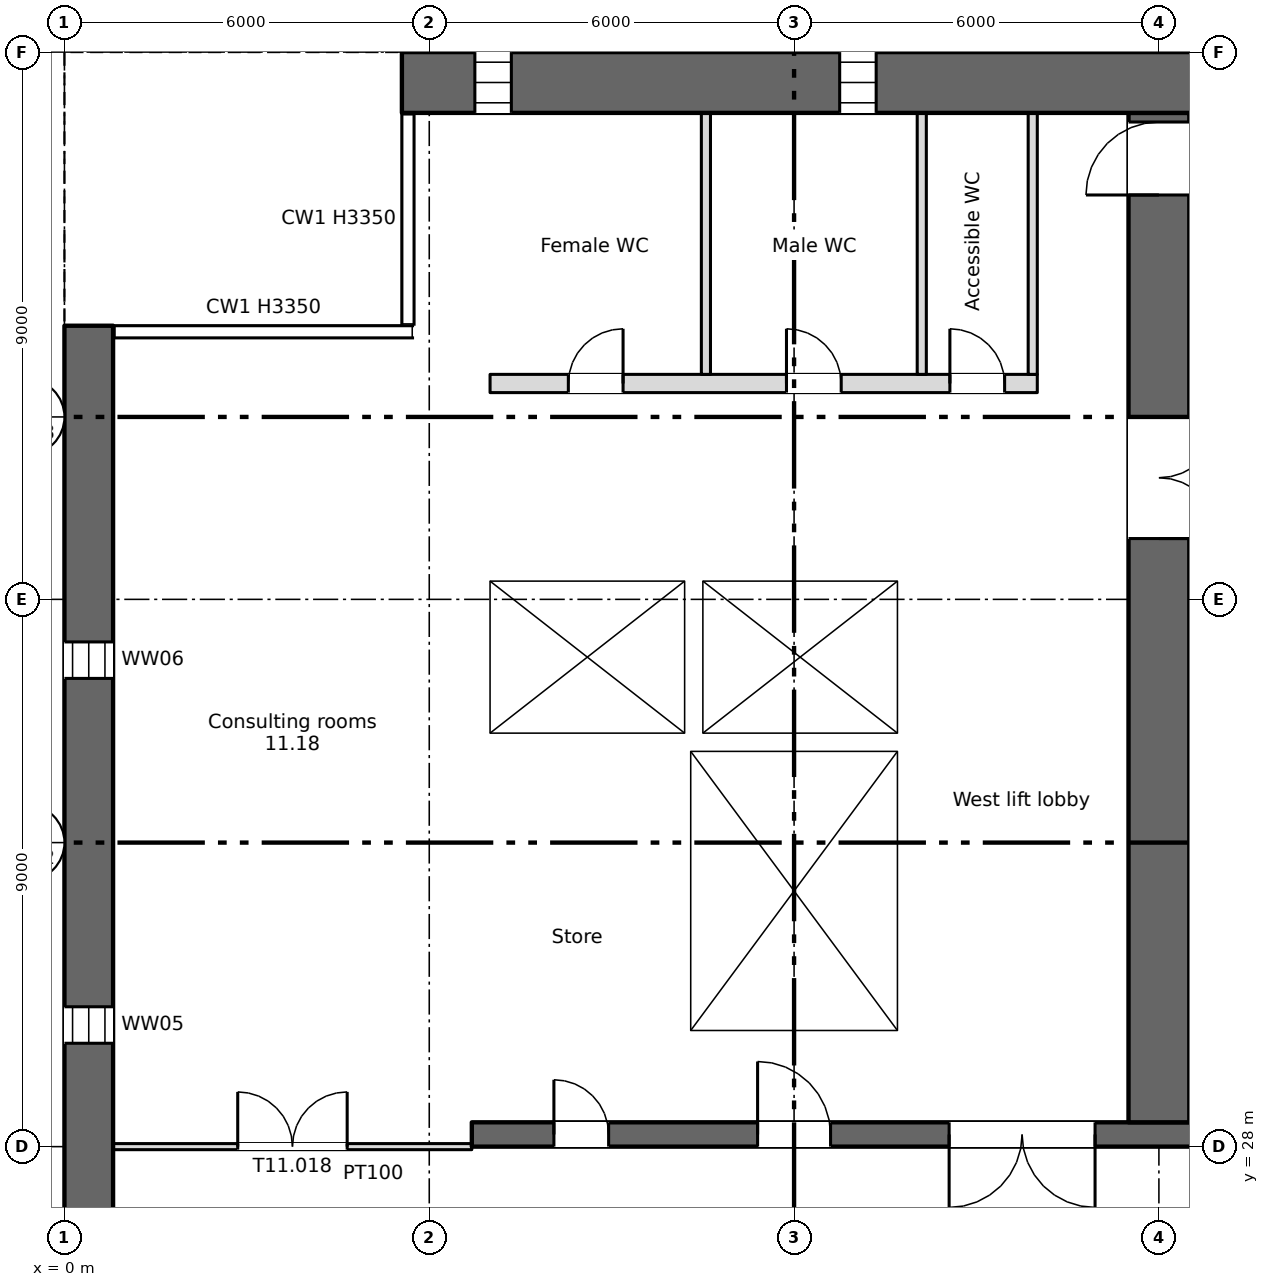
"""IFC4 building model, lengths in metres.
Left out: names, types, materials, properties, quantities, classifications, styles, units other than length and angle.
Written with IfcOpenShell. Run it as: python <this file> out.ifc"""

import sys

from ifc_helpers import new_model, si_unit, direction, frame, frame_2d, origin, place, context, subcontext, project, spatial, rectangle, extrude, element, fill, save


model = new_model("IFC4")
c1 = context("Model", 3, precision=1e-05, world=origin(), true_north=direction((0.0, 1.0)))
c2 = subcontext(c1, "Body", "Model", "MODEL_VIEW")
j1 = project(units=[si_unit("LENGTHUNIT", "METRE"), si_unit("PLANEANGLEUNIT", "RADIAN")], contexts=[c1])
p1 = place(None, origin())
s1 = spatial("IfcSite", under=j1, at=p1, CompositionType="ELEMENT")
p2 = place(p1, origin())
s2 = spatial("IfcBuilding", under=s1, at=p2, CompositionType="ELEMENT")
p3 = place(p2, frame((0.0, 0.0, 56.25)))
s3 = spatial("IfcBuildingStorey", under=s2, at=p3, CompositionType="ELEMENT", Elevation=56.25)
p4 = place(p3, frame((0.4, 4.5, 0.0), z_axis=(0.0, 0.0, 1.0), x_axis=(0.0, 1.0, 0.0)))
e1 = element("IfcWall", 1, at=p4, inside=s3, PredefinedType="SHEAR", context=c2, shape_type="SweptSolid", body=[
    extrude(rectangle(XDim=37.0, YDim=0.8, at=frame_2d((18.5, 0.0))), origin(), (0.0, 0.0, 1.0), 3.35),
])
p5 = place(p4, frame((1.2, 0.0, 0.6)))
e2 = element("IfcOpeningElement", 2, at=p5, cuts=e1, PredefinedType="OPENING", context=c2, shape_type="SweptSolid", body=[
    extrude(rectangle(XDim=0.6, YDim=2.4, at=frame_2d((0.3, 1.2))), frame((0.0, 0.41, 0.0), z_axis=(0.0, -1.0, 0.0), x_axis=(1.0, 0.0, 0.0)), (0.0, 0.0, 1.0), 0.82),
])
p6 = place(p4, frame((7.2, 0.0, 0.6)))
e3 = element("IfcOpeningElement", 3, at=p6, cuts=e1, PredefinedType="OPENING", context=c2, shape_type="SweptSolid", body=[
    extrude(rectangle(XDim=0.6, YDim=2.4, at=frame_2d((0.3, 1.2))), frame((0.0, 0.41, 0.0), z_axis=(0.0, -1.0, 0.0), x_axis=(1.0, 0.0, 0.0)), (0.0, 0.0, 1.0), 0.82),
])
p7 = place(p4, frame((13.2, 0.0, 0.6)))
e4 = element("IfcOpeningElement", 4, at=p7, cuts=e1, PredefinedType="OPENING", context=c2, shape_type="SweptSolid", body=[
    extrude(rectangle(XDim=0.6, YDim=2.4, at=frame_2d((0.3, 1.2))), frame((0.0, 0.41, 0.0), z_axis=(0.0, -1.0, 0.0), x_axis=(1.0, 0.0, 0.0)), (0.0, 0.0, 1.0), 0.82),
])
p8 = place(p4, frame((19.2, 0.0, 0.6)))
e5 = element("IfcOpeningElement", 5, at=p8, cuts=e1, PredefinedType="OPENING", context=c2, shape_type="SweptSolid", body=[
    extrude(rectangle(XDim=0.6, YDim=2.4, at=frame_2d((0.3, 1.2))), frame((0.0, 0.41, 0.0), z_axis=(0.0, -1.0, 0.0), x_axis=(1.0, 0.0, 0.0)), (0.0, 0.0, 1.0), 0.82),
])
p9 = place(p4, frame((25.2, 0.0, 0.6)))
e6 = element("IfcOpeningElement", 6, at=p9, cuts=e1, PredefinedType="OPENING", context=c2, shape_type="SweptSolid", body=[
    extrude(rectangle(XDim=0.6, YDim=2.4, at=frame_2d((0.3, 1.2))), frame((0.0, 0.41, 0.0), z_axis=(0.0, -1.0, 0.0), x_axis=(1.0, 0.0, 0.0)), (0.0, 0.0, 1.0), 0.82),
])
p10 = place(p4, frame((31.2, 0.0, 0.6)))
e7 = element("IfcOpeningElement", 7, at=p10, cuts=e1, PredefinedType="OPENING", context=c2, shape_type="SweptSolid", body=[
    extrude(rectangle(XDim=0.6, YDim=2.4, at=frame_2d((0.3, 1.2))), frame((0.0, 0.41, 0.0), z_axis=(0.0, -1.0, 0.0), x_axis=(1.0, 0.0, 0.0)), (0.0, 0.0, 1.0), 0.82),
])
p11 = place(p3, frame((5.55, 45.5, 0.0), z_axis=(0.0, 0.0, 1.0), x_axis=(1.0, 0.0, 0.0)))
e8 = element("IfcWall", 8, at=p11, inside=s3, PredefinedType="SHEAR", context=c2, shape_type="SweptSolid", body=[
    extrude(rectangle(XDim=66.9, YDim=1.0, at=frame_2d((33.45, 0.0))), origin(), (0.0, 0.0, 1.0), 3.35),
])
p12 = place(p11, frame((1.2, 0.0, 0.6)))
e9 = element("IfcOpeningElement", 9, at=p12, cuts=e8, PredefinedType="OPENING", context=c2, shape_type="SweptSolid", body=[
    extrude(rectangle(XDim=0.6, YDim=2.4, at=frame_2d((0.3, 1.2))), frame((0.0, 0.51, 0.0), z_axis=(0.0, -1.0, 0.0), x_axis=(1.0, 0.0, 0.0)), (0.0, 0.0, 1.0), 1.02),
])
p13 = place(p11, frame((7.2, 0.0, 0.6)))
e10 = element("IfcOpeningElement", 10, at=p13, cuts=e8, PredefinedType="OPENING", context=c2, shape_type="SweptSolid", body=[
    extrude(rectangle(XDim=0.6, YDim=2.4, at=frame_2d((0.3, 1.2))), frame((0.0, 0.51, 0.0), z_axis=(0.0, -1.0, 0.0), x_axis=(1.0, 0.0, 0.0)), (0.0, 0.0, 1.0), 1.02),
])
p14 = place(p11, frame((61.2, 0.0, 0.6)))
e11 = element("IfcOpeningElement", 11, at=p14, cuts=e8, PredefinedType="OPENING", context=c2, shape_type="SweptSolid", body=[
    extrude(rectangle(XDim=0.6, YDim=2.4, at=frame_2d((0.3, 1.2))), frame((0.0, 0.51, 0.0), z_axis=(0.0, -1.0, 0.0), x_axis=(1.0, 0.0, 0.0)), (0.0, 0.0, 1.0), 1.02),
])
p15 = place(p3, frame((6.7, 28.2, 0.0), z_axis=(0.0, 0.0, 1.0), x_axis=(1.0, 0.0, 0.0)))
e12 = element("IfcWall", 12, at=p15, inside=s3, PredefinedType="SHEAR", context=c2, shape_type="SweptSolid", body=[
    extrude(rectangle(XDim=57.8, YDim=0.4, at=frame_2d((28.9, 0.0))), origin(), (0.0, 0.0, 1.0), 3.35),
])
p16 = place(p15, frame((13.85, 0.0, 0.0)))
e13 = element("IfcOpeningElement", 13, at=p16, cuts=e12, PredefinedType="OPENING", context=c2, shape_type="SweptSolid", body=[
    extrude(rectangle(XDim=0.9, YDim=2.1, at=frame_2d((0.45, 1.05))), frame((0.0, 0.21, 0.0), z_axis=(0.0, -1.0, 0.0), x_axis=(1.0, 0.0, 0.0)), (0.0, 0.0, 1.0), 0.42),
])
p17 = place(p15, frame((48.562, 0.0, 0.0)))
e14 = element("IfcOpeningElement", 14, at=p17, cuts=e12, PredefinedType="OPENING", context=c2, shape_type="SweptSolid", body=[
    extrude(rectangle(XDim=0.9, YDim=2.1, at=frame_2d((0.45, 1.05))), frame((0.0, 0.21, 0.0), z_axis=(0.0, -1.0, 0.0), x_axis=(1.0, 0.0, 0.0)), (0.0, 0.0, 1.0), 0.42),
])
p18 = place(p15, frame((51.137, 0.0, 0.0)))
e15 = element("IfcOpeningElement", 15, at=p18, cuts=e12, PredefinedType="OPENING", context=c2, shape_type="SweptSolid", body=[
    extrude(rectangle(XDim=0.9, YDim=2.1, at=frame_2d((0.45, 1.05))), frame((0.0, 0.21, 0.0), z_axis=(0.0, -1.0, 0.0), x_axis=(1.0, 0.0, 0.0)), (0.0, 0.0, 1.0), 0.42),
])
p19 = place(p15, frame((1.35, 0.0, 0.0)))
e16 = element("IfcOpeningElement", 16, at=p19, cuts=e12, PredefinedType="OPENING", context=c2, shape_type="SweptSolid", body=[
    extrude(rectangle(XDim=0.9, YDim=2.1, at=frame_2d((0.45, 1.05))), frame((0.0, 0.21, 0.0), z_axis=(0.0, -1.0, 0.0), x_axis=(1.0, 0.0, 0.0)), (0.0, 0.0, 1.0), 0.42),
])
p20 = place(p15, frame((4.7, 0.0, 0.0)))
e17 = element("IfcOpeningElement", 17, at=p20, cuts=e12, PredefinedType="OPENING", context=c2, shape_type="SweptSolid", body=[
    extrude(rectangle(XDim=1.2, YDim=2.1, at=frame_2d((0.6, 1.05))), frame((0.0, 0.21, 0.0), z_axis=(0.0, -1.0, 0.0), x_axis=(1.0, 0.0, 0.0)), (0.0, 0.0, 1.0), 0.42),
])
p21 = place(p15, frame((31.7, 0.0, 0.0)))
e18 = element("IfcOpeningElement", 18, at=p21, cuts=e12, PredefinedType="OPENING", context=c2, shape_type="SweptSolid", body=[
    extrude(rectangle(XDim=1.2, YDim=2.1, at=frame_2d((0.6, 1.05))), frame((0.0, 0.21, 0.0), z_axis=(0.0, -1.0, 0.0), x_axis=(1.0, 0.0, 0.0)), (0.0, 0.0, 1.0), 0.42),
])
p22 = place(p15, frame((55.2, 0.0, 0.0)))
e19 = element("IfcOpeningElement", 19, at=p22, cuts=e12, PredefinedType="OPENING", context=c2, shape_type="SweptSolid", body=[
    extrude(rectangle(XDim=1.2, YDim=2.1, at=frame_2d((0.6, 1.05))), frame((0.0, 0.21, 0.0), z_axis=(0.0, -1.0, 0.0), x_axis=(1.0, 0.0, 0.0)), (0.0, 0.0, 1.0), 0.42),
])
p23 = place(p15, frame((21.7, 0.0, 0.0)))
e20 = element("IfcOpeningElement", 20, at=p23, cuts=e12, PredefinedType="OPENING", context=c2, shape_type="SweptSolid", body=[
    extrude(rectangle(XDim=1.2, YDim=2.1, at=frame_2d((0.6, 1.05))), frame((0.0, 0.21, 0.0), z_axis=(0.0, -1.0, 0.0), x_axis=(1.0, 0.0, 0.0)), (0.0, 0.0, 1.0), 0.42),
])
p24 = place(p15, frame((41.7, 0.0, 0.0)))
e21 = element("IfcOpeningElement", 21, at=p24, cuts=e12, PredefinedType="OPENING", context=c2, shape_type="SweptSolid", body=[
    extrude(rectangle(XDim=1.2, YDim=2.1, at=frame_2d((0.6, 1.05))), frame((0.0, 0.21, 0.0), z_axis=(0.0, -1.0, 0.0), x_axis=(1.0, 0.0, 0.0)), (0.0, 0.0, 1.0), 0.42),
])
p25 = place(p15, frame((24.85, 0.0, 0.0)))
e22 = element("IfcOpeningElement", 22, at=p25, cuts=e12, PredefinedType="OPENING", context=c2, shape_type="SweptSolid", body=[
    extrude(rectangle(XDim=2.4, YDim=2.1, at=frame_2d((1.2, 1.05))), frame((0.0, 0.21, 0.0), z_axis=(0.0, -1.0, 0.0), x_axis=(1.0, 0.0, 0.0)), (0.0, 0.0, 1.0), 0.42),
])
p26 = place(p15, frame((37.35, 0.0, 0.0)))
e23 = element("IfcOpeningElement", 23, at=p26, cuts=e12, PredefinedType="OPENING", context=c2, shape_type="SweptSolid", body=[
    extrude(rectangle(XDim=2.4, YDim=2.1, at=frame_2d((1.2, 1.05))), frame((0.0, 0.21, 0.0), z_axis=(0.0, -1.0, 0.0), x_axis=(1.0, 0.0, 0.0)), (0.0, 0.0, 1.0), 0.42),
])
p27 = place(p15, frame((7.85, 0.0, 0.0)))
e24 = element("IfcOpeningElement", 24, at=p27, cuts=e12, PredefinedType="OPENING", context=c2, shape_type="SweptSolid", body=[
    extrude(rectangle(XDim=2.4, YDim=2.1, at=frame_2d((1.2, 1.05))), frame((0.0, 0.21, 0.0), z_axis=(0.0, -1.0, 0.0), x_axis=(1.0, 0.0, 0.0)), (0.0, 0.0, 1.0), 0.42),
])
p28 = place(p15, frame((28.85, 0.0, 0.0)))
e25 = element("IfcOpeningElement", 25, at=p28, cuts=e12, PredefinedType="OPENING", context=c2, shape_type="SweptSolid", body=[
    extrude(rectangle(XDim=0.9, YDim=2.1, at=frame_2d((0.45, 1.05))), frame((0.0, 0.21, 0.0), z_axis=(0.0, -1.0, 0.0), x_axis=(1.0, 0.0, 0.0)), (0.0, 0.0, 1.0), 0.42),
])
p29 = place(p15, frame((34.85, 0.0, 0.0)))
e26 = element("IfcOpeningElement", 26, at=p29, cuts=e12, PredefinedType="OPENING", context=c2, shape_type="SweptSolid", body=[
    extrude(rectangle(XDim=0.9, YDim=2.1, at=frame_2d((0.45, 1.05))), frame((0.0, 0.21, 0.0), z_axis=(0.0, -1.0, 0.0), x_axis=(1.0, 0.0, 0.0)), (0.0, 0.0, 1.0), 0.42),
])
p30 = place(p3, frame((6.85, 28.4, 0.0), z_axis=(0.0, 0.0, 1.0), x_axis=(0.0, 1.0, 0.0)))
e27 = element("IfcWall", 27, at=p30, inside=s3, PredefinedType="SHEAR", context=c2, shape_type="SweptSolid", body=[
    extrude(rectangle(XDim=16.6, YDim=0.3, at=frame_2d((8.3, 0.0))), origin(), (0.0, 0.0, 1.0), 3.35),
])
p31 = place(p3, frame((18.0, 28.4, 0.0), z_axis=(0.0, 0.0, 1.0), x_axis=(0.0, 1.0, 0.0)))
e28 = element("IfcWall", 28, at=p31, inside=s3, PredefinedType="SHEAR", context=c2, shape_type="SweptSolid", body=[
    extrude(rectangle(XDim=16.6, YDim=1.0, at=frame_2d((8.3, 0.0))), origin(), (0.0, 0.0, 1.0), 3.35),
])
p32 = place(p31, frame((9.6, 0.0, 0.0)))
e29 = element("IfcOpeningElement", 29, at=p32, cuts=e28, PredefinedType="OPENING", context=c2, shape_type="SweptSolid", body=[
    extrude(rectangle(XDim=2.0, YDim=2.1, at=frame_2d((1.0, 1.05))), frame((0.0, 0.51, 0.0), z_axis=(0.0, -1.0, 0.0), x_axis=(1.0, 0.0, 0.0)), (0.0, 0.0, 1.0), 1.02),
])
p33 = place(p31, frame((15.25, 0.0, 0.0)))
e30 = element("IfcOpeningElement", 30, at=p33, cuts=e28, PredefinedType="OPENING", context=c2, shape_type="SweptSolid", body=[
    extrude(rectangle(XDim=1.2, YDim=2.1, at=frame_2d((0.6, 1.05))), frame((0.0, 0.51, 0.0), z_axis=(0.0, -1.0, 0.0), x_axis=(1.0, 0.0, 0.0)), (0.0, 0.0, 1.0), 1.02),
])
for number, where, z_axis, x_axis in (
    (31, (10.15, 28.4, 0.0), (0.0, 0.0, 1.0), (0.0, 1.0, 0.0)),
    (32, (13.85, 28.4, 0.0), (0.0, 0.0, 1.0), (0.0, 1.0, 0.0)),
):
    element("IfcWall", number, at=place(p3, frame(where, z_axis=z_axis, x_axis=x_axis)), inside=s3, PredefinedType="SHEAR", context=c2, shape_type="SweptSolid", body=[
        extrude(rectangle(XDim=6.1, YDim=0.3, at=frame_2d((3.05, 0.0))), origin(), (0.0, 0.0, 1.0), 3.35),
    ])
for number, where, z_axis, x_axis in (
    (33, (7.0, 34.65, 0.0), (0.0, 0.0, 1.0), (1.0, 0.0, 0.0)),
    (34, (7.0, 37.45, 0.0), (0.0, 0.0, 1.0), (1.0, 0.0, 0.0)),
):
    element("IfcWall", number, at=place(p3, frame(where, z_axis=z_axis, x_axis=x_axis)), inside=s3, PredefinedType="SHEAR", context=c2, shape_type="SweptSolid", body=[
        extrude(rectangle(XDim=7.0, YDim=0.3, at=frame_2d((3.5, 0.0))), origin(), (0.0, 0.0, 1.0), 3.35),
    ])
p34 = place(p3, frame((13.85, 34.8, 0.0), z_axis=(0.0, 0.0, 1.0), x_axis=(0.0, 1.0, 0.0)))
e35 = element("IfcWall", 35, at=p34, inside=s3, PredefinedType="SHEAR", context=c2, shape_type="SweptSolid", body=[
    extrude(rectangle(XDim=2.5, YDim=0.3, at=frame_2d((1.25, 0.0))), origin(), (0.0, 0.0, 1.0), 3.35),
])
p35 = place(p3, frame((7.0, 40.55, 0.0), z_axis=(0.0, 0.0, 1.0), x_axis=(1.0, 0.0, 0.0)))
e36 = element("IfcWall", 36, at=p35, inside=s3, PredefinedType="PARTITIONING", context=c2, shape_type="SweptSolid", body=[
    extrude(rectangle(XDim=9.0, YDim=0.3, at=frame_2d((4.5, 0.0))), origin(), (0.0, 0.0, 1.0), 3.35),
])
p36 = place(p35, frame((1.288, 0.0, 0.0)))
e37 = element("IfcOpeningElement", 37, at=p36, cuts=e36, PredefinedType="OPENING", context=c2, shape_type="SweptSolid", body=[
    extrude(rectangle(XDim=0.9, YDim=2.1, at=frame_2d((0.45, 1.05))), frame((0.0, 0.16, 0.0), z_axis=(0.0, -1.0, 0.0), x_axis=(1.0, 0.0, 0.0)), (0.0, 0.0, 1.0), 0.32),
])
p37 = place(p35, frame((4.875, 0.0, 0.0)))
e38 = element("IfcOpeningElement", 38, at=p37, cuts=e36, PredefinedType="OPENING", context=c2, shape_type="SweptSolid", body=[
    extrude(rectangle(XDim=0.9, YDim=2.1, at=frame_2d((0.45, 1.05))), frame((0.0, 0.16, 0.0), z_axis=(0.0, -1.0, 0.0), x_axis=(1.0, 0.0, 0.0)), (0.0, 0.0, 1.0), 0.32),
])
p38 = place(p35, frame((7.562, 0.0, 0.0)))
e39 = element("IfcOpeningElement", 39, at=p38, cuts=e36, PredefinedType="OPENING", context=c2, shape_type="SweptSolid", body=[
    extrude(rectangle(XDim=0.9, YDim=2.1, at=frame_2d((0.45, 1.05))), frame((0.0, 0.16, 0.0), z_axis=(0.0, -1.0, 0.0), x_axis=(1.0, 0.0, 0.0)), (0.0, 0.0, 1.0), 0.32),
])
p39 = place(p3, frame((10.35, 34.8, 0.0), z_axis=(0.0, 0.0, 1.0), x_axis=(0.0, 1.0, 0.0)))
e40 = element("IfcWall", 40, at=p39, inside=s3, PredefinedType="SHEAR", context=c2, shape_type="SweptSolid", body=[
    extrude(rectangle(XDim=2.5, YDim=0.3, at=frame_2d((1.25, 0.0))), origin(), (0.0, 0.0, 1.0), 3.35),
])
for number, where, z_axis, x_axis in (
    (41, (15.925, 40.7, 0.0), (0.0, 0.0, 1.0), (0.0, 1.0, 0.0)),
    (42, (10.55, 40.7, 0.0), (0.0, 0.0, 1.0), (0.0, 1.0, 0.0)),
    (43, (14.1, 40.7, 0.0), (0.0, 0.0, 1.0), (0.0, 1.0, 0.0)),
):
    element("IfcWall", number, at=place(p3, frame(where, z_axis=z_axis, x_axis=x_axis)), inside=s3, PredefinedType="PARTITIONING", context=c2, shape_type="SweptSolid", body=[
        extrude(rectangle(XDim=4.3, YDim=0.15, at=frame_2d((2.15, 0.0))), origin(), (0.0, 0.0, 1.0), 3.35),
    ])
p40 = place(p3, frame((0.8, 28.0, 0.0), z_axis=(0.0, 0.0, 1.0), x_axis=(1.0, 0.0, 0.0)))
e44 = element("IfcWall", 44, at=p40, inside=s3, PredefinedType="PARTITIONING", context=c2, shape_type="SweptSolid", body=[
    extrude(rectangle(XDim=5.9, YDim=0.1, at=frame_2d((2.95, 0.0))), origin(), (0.0, 0.0, 1.0), 3.35),
])
p41 = place(p40, frame((2.05, 0.0, 0.0)))
e45 = element("IfcOpeningElement", 45, at=p41, cuts=e44, PredefinedType="OPENING", context=c2, shape_type="SweptSolid", body=[
    extrude(rectangle(XDim=1.8, YDim=2.1, at=frame_2d((0.9, 1.05))), frame((0.0, 0.06, 0.0), z_axis=(0.0, -1.0, 0.0), x_axis=(1.0, 0.0, 0.0)), (0.0, 0.0, 1.0), 0.12),
])
p42 = place(p12, origin())
e46 = element("IfcWindow", 46, at=p42, inside=s3, PartitioningType="SINGLE_PANEL", PredefinedType="WINDOW", context=c2, shape_type="SweptSolid", body=[
    extrude(rectangle(XDim=0.6, YDim=2.4, at=frame_2d((0.3, 1.2))), frame((0.0, 0.03, 0.0), z_axis=(0.0, -1.0, 0.0), x_axis=(1.0, 0.0, 0.0)), (0.0, 0.0, 1.0), 0.06),
])
fill(e9, e46)
p43 = place(p13, origin())
e47 = element("IfcWindow", 47, at=p43, inside=s3, PartitioningType="SINGLE_PANEL", PredefinedType="WINDOW", context=c2, shape_type="SweptSolid", body=[
    extrude(rectangle(XDim=0.6, YDim=2.4, at=frame_2d((0.3, 1.2))), frame((0.0, 0.03, 0.0), z_axis=(0.0, -1.0, 0.0), x_axis=(1.0, 0.0, 0.0)), (0.0, 0.0, 1.0), 0.06),
])
fill(e10, e47)
p44 = place(p9, origin())
e48 = element("IfcWindow", 48, at=p44, inside=s3, PartitioningType="SINGLE_PANEL", PredefinedType="WINDOW", context=c2, shape_type="SweptSolid", body=[
    extrude(rectangle(XDim=0.6, YDim=2.4, at=frame_2d((0.3, 1.2))), frame((0.0, 0.03, 0.0), z_axis=(0.0, -1.0, 0.0), x_axis=(1.0, 0.0, 0.0)), (0.0, 0.0, 1.0), 0.06),
])
fill(e6, e48)
p45 = place(p10, origin())
e49 = element("IfcWindow", 49, at=p45, inside=s3, PartitioningType="SINGLE_PANEL", PredefinedType="WINDOW", context=c2, shape_type="SweptSolid", body=[
    extrude(rectangle(XDim=0.6, YDim=2.4, at=frame_2d((0.3, 1.2))), frame((0.0, 0.03, 0.0), z_axis=(0.0, -1.0, 0.0), x_axis=(1.0, 0.0, 0.0)), (0.0, 0.0, 1.0), 0.06),
])
fill(e7, e49)
p46 = place(p19, origin())
e50 = element("IfcDoor", 50, at=p46, inside=s3, OperationType="SINGLE_SWING_LEFT", PredefinedType="DOOR", context=c2, shape_type="SweptSolid", body=[
    extrude(rectangle(XDim=0.9, YDim=2.1, at=frame_2d((0.45, 1.05))), frame((0.0, 0.025, 0.0), z_axis=(0.0, -1.0, 0.0), x_axis=(1.0, 0.0, 0.0)), (0.0, 0.0, 1.0), 0.05),
])
fill(e16, e50)
p47 = place(p36, origin())
e51 = element("IfcDoor", 51, at=p47, inside=s3, OperationType="SINGLE_SWING_RIGHT", PredefinedType="DOOR", context=c2, shape_type="SweptSolid", body=[
    extrude(rectangle(XDim=0.9, YDim=2.1, at=frame_2d((0.45, 1.05))), frame((0.0, 0.025, 0.0), z_axis=(0.0, -1.0, 0.0), x_axis=(1.0, 0.0, 0.0)), (0.0, 0.0, 1.0), 0.05),
])
fill(e37, e51)
p48 = place(p37, origin())
e52 = element("IfcDoor", 52, at=p48, inside=s3, OperationType="SINGLE_SWING_LEFT", PredefinedType="DOOR", context=c2, shape_type="SweptSolid", body=[
    extrude(rectangle(XDim=0.9, YDim=2.1, at=frame_2d((0.45, 1.05))), frame((0.0, 0.025, 0.0), z_axis=(0.0, -1.0, 0.0), x_axis=(1.0, 0.0, 0.0)), (0.0, 0.0, 1.0), 0.05),
])
fill(e38, e52)
p49 = place(p38, origin())
e53 = element("IfcDoor", 53, at=p49, inside=s3, OperationType="SINGLE_SWING_LEFT", PredefinedType="DOOR", context=c2, shape_type="SweptSolid", body=[
    extrude(rectangle(XDim=0.9, YDim=2.1, at=frame_2d((0.45, 1.05))), frame((0.0, 0.025, 0.0), z_axis=(0.0, -1.0, 0.0), x_axis=(1.0, 0.0, 0.0)), (0.0, 0.0, 1.0), 0.05),
])
fill(e39, e53)
p50 = place(p20, origin())
e54 = element("IfcDoor", 54, at=p50, inside=s3, OperationType="SINGLE_SWING_LEFT", PredefinedType="DOOR", context=c2, shape_type="SweptSolid", body=[
    extrude(rectangle(XDim=1.2, YDim=2.1, at=frame_2d((0.6, 1.05))), frame((0.0, 0.025, 0.0), z_axis=(0.0, -1.0, 0.0), x_axis=(1.0, 0.0, 0.0)), (0.0, 0.0, 1.0), 0.05),
])
fill(e17, e54)
p51 = place(p27, origin())
e55 = element("IfcDoor", 55, at=p51, inside=s3, OperationType="DOUBLE_DOOR_SINGLE_SWING", PredefinedType="DOOR", context=c2, shape_type="SweptSolid", body=[
    extrude(rectangle(XDim=2.4, YDim=2.1, at=frame_2d((1.2, 1.05))), frame((0.0, 0.025, 0.0), z_axis=(0.0, -1.0, 0.0), x_axis=(1.0, 0.0, 0.0)), (0.0, 0.0, 1.0), 0.05),
])
fill(e24, e55)
p52 = place(p32, origin())
e56 = element("IfcDoor", 56, at=p52, inside=s3, OperationType="DOUBLE_DOOR_SINGLE_SWING", PredefinedType="DOOR", context=c2, shape_type="SweptSolid", body=[
    extrude(rectangle(XDim=2.0, YDim=2.1, at=frame_2d((1.0, 1.05))), frame((0.0, 0.025, 0.0), z_axis=(0.0, -1.0, 0.0), x_axis=(1.0, 0.0, 0.0)), (0.0, 0.0, 1.0), 0.05),
])
fill(e29, e56)
p53 = place(p33, origin())
e57 = element("IfcDoor", 57, at=p53, inside=s3, OperationType="SINGLE_SWING_LEFT", PredefinedType="DOOR", context=c2, shape_type="SweptSolid", body=[
    extrude(rectangle(XDim=1.2, YDim=2.1, at=frame_2d((0.6, 1.05))), frame((0.0, 0.025, 0.0), z_axis=(0.0, -1.0, 0.0), x_axis=(1.0, 0.0, 0.0)), (0.0, 0.0, 1.0), 0.05),
])
fill(e30, e57)
p54 = place(p41, origin())
e58 = element("IfcDoor", 58, at=p54, inside=s3, OperationType="DOUBLE_DOOR_SINGLE_SWING", PredefinedType="DOOR", context=c2, shape_type="SweptSolid", body=[
    extrude(rectangle(XDim=1.8, YDim=2.1, at=frame_2d((0.9, 1.05))), frame((0.0, 0.025, 0.0), z_axis=(0.0, -1.0, 0.0), x_axis=(1.0, 0.0, 0.0)), (0.0, 0.0, 1.0), 0.05),
])
fill(e45, e58)
save(model, sys.argv[1])
